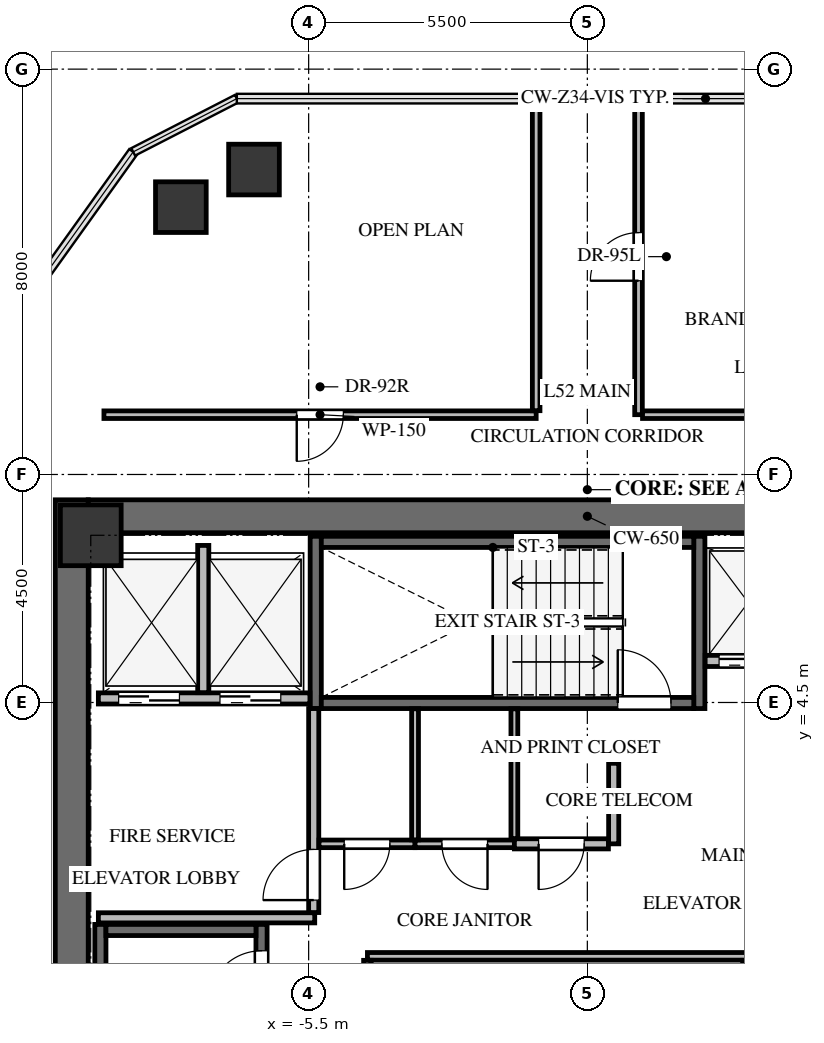
"""IFC4 building model, lengths in metres.
Left out: names, types, materials, properties, quantities, classifications, styles, units other than length and angle.
Written with IfcOpenShell. Run it as: python <this file> out.ifc"""

import sys

from ifc_helpers import new_model, si_unit, direction, frame, frame_2d, origin, origin_2d, place, context, subcontext, project, spatial, rectangle, extrude, source, transform, mapped, element, fill, save


model = new_model("IFC4")
c1 = context("Model", 3, precision=1e-05, world=origin(), true_north=direction((0.0, 1.0)))
c2 = subcontext(c1, "Body", "Model", "MODEL_VIEW")
j1 = project(units=[si_unit("LENGTHUNIT", "METRE"), si_unit("PLANEANGLEUNIT", "RADIAN")], contexts=[c1])
p1 = place(None, origin())
s1 = spatial("IfcSite", under=j1, at=p1, CompositionType="ELEMENT")
p2 = place(p1, origin())
s2 = spatial("IfcBuilding", under=s1, at=p2, CompositionType="ELEMENT")
p3 = place(p2, frame((0.0, 0.0, 190.3)))
s3 = spatial("IfcBuildingStorey", under=s2, at=p3, CompositionType="ELEMENT", Elevation=190.3)
p4 = place(p3, frame((-10.175, -8.5, 0.0), z_axis=(0.0, 0.0, 1.0), x_axis=(0.0, 1.0, 0.0)))
e1 = element("IfcWall", 1, at=p4, inside=s3, PredefinedType="SHEAR", context=c2, shape_type="SweptSolid", body=[
    extrude(rectangle(XDim=17.0, YDim=0.65, at=frame_2d((8.5, 0.0))), origin(), (0.0, 0.0, 1.0), 3.3),
])
p5 = place(p3, frame((-9.85, 8.175, 0.0), z_axis=(0.0, 0.0, 1.0), x_axis=(1.0, 0.0, 0.0)))
e2 = element("IfcWall", 2, at=p5, inside=s3, PredefinedType="SHEAR", context=c2, shape_type="SweptSolid", body=[
    extrude(rectangle(XDim=19.7, YDim=0.65, at=frame_2d((9.85, 0.0))), origin(), (0.0, 0.0, 1.0), 3.3),
])
p6 = place(p3, frame((-6.43, -7.77, -0.24), z_axis=(0.0, 0.0, 1.0), x_axis=(0.0, 1.0, 0.0)))
e3 = element("IfcWall", 3, at=p6, inside=s3, PredefinedType="SHEAR", context=c2, shape_type="SweptSolid", body=[
    extrude(rectangle(XDim=7.89, YDim=0.22, at=frame_2d((3.945, 0.0))), origin(), (0.0, 0.0, 1.0), 3.3),
])
p7 = place(p6, frame((6.32, 0.0, 0.0)))
e4 = element("IfcOpeningElement", 4, at=p7, cuts=e3, PredefinedType="OPENING", context=c2, shape_type="SweptSolid", body=[
    extrude(rectangle(XDim=1.05, YDim=2.15, at=frame_2d((0.525, 1.075))), frame((0.0, 0.12, 0.0), z_axis=(0.0, -1.0, 0.0), x_axis=(1.0, 0.0, 0.0)), (0.0, 0.0, 1.0), 0.24),
])
p8 = place(p3, frame((-9.61, 0.12, -0.24), z_axis=(0.0, 0.0, 1.0), x_axis=(0.0, -1.0, 0.0)))
e5 = element("IfcWall", 5, at=p8, inside=s3, PredefinedType="SHEAR", context=c2, shape_type="SweptSolid", body=[
    extrude(rectangle(XDim=7.89, YDim=0.22, at=frame_2d((3.945, 0.0))), origin(), (0.0, 0.0, 1.0), 3.3),
])
p9 = place(p3, frame((-6.54, 0.01, -0.24), z_axis=(0.0, 0.0, 1.0), x_axis=(-1.0, 0.0, 0.0)))
e6 = element("IfcWall", 6, at=p9, inside=s3, PredefinedType="SHEAR", context=c2, shape_type="SweptSolid", body=[
    extrude(rectangle(XDim=2.96, YDim=0.22, at=frame_2d((1.48, 0.0))), origin(), (0.0, 0.0, 1.0), 3.3),
])
for number, where, z_axis, x_axis in (
    (7, (2.21, 4.38, -0.24), (0.0, 0.0, 1.0), (0.0, 1.0, 0.0)),
    (8, (-5.36, 7.78, -0.24), (0.0, 0.0, 1.0), (0.0, -1.0, 0.0)),
):
    element("IfcWall", number, at=place(p3, frame(where, z_axis=z_axis, x_axis=x_axis)), inside=s3, PredefinedType="SHEAR", context=c2, shape_type="SweptSolid", body=[
        extrude(rectangle(XDim=3.4, YDim=0.22, at=frame_2d((1.7, 0.0))), origin(), (0.0, 0.0, 1.0), 3.3),
    ])
p10 = place(p3, frame((-5.25, 4.49, -0.24), z_axis=(0.0, 0.0, 1.0), x_axis=(1.0, 0.0, 0.0)))
e9 = element("IfcWall", 9, at=p10, inside=s3, PredefinedType="SHEAR", context=c2, shape_type="SweptSolid", body=[
    extrude(rectangle(XDim=7.35, YDim=0.22, at=frame_2d((3.675, 0.0))), origin(), (0.0, 0.0, 1.0), 3.3),
])
p11 = place(p10, frame((5.85, 0.0, 0.0)))
e10 = element("IfcOpeningElement", 10, at=p11, cuts=e9, PredefinedType="OPENING", context=c2, shape_type="SweptSolid", body=[
    extrude(rectangle(XDim=1.05, YDim=2.15, at=frame_2d((0.525, 1.075))), frame((0.0, 0.12, 0.0), z_axis=(0.0, -1.0, 0.0), x_axis=(1.0, 0.0, 0.0)), (0.0, 0.0, 1.0), 0.24),
])
p12 = place(p3, frame((2.1, 7.67, -0.24), z_axis=(0.0, 0.0, 1.0), x_axis=(-1.0, 0.0, 0.0)))
e11 = element("IfcWall", 11, at=p12, inside=s3, PredefinedType="SHEAR", context=c2, shape_type="SweptSolid", body=[
    extrude(rectangle(XDim=7.35, YDim=0.22, at=frame_2d((3.675, 0.0))), origin(), (0.0, 0.0, 1.0), 3.3),
])
m1 = source(origin(), c2, "Body", "SweptSolid", [
    extrude(rectangle(XDim=1.2, YDim=1.2, at=origin_2d()), origin(), (0.0, 0.0, 1.0), 3.3),
])
p13 = place(p3, frame((-9.8, 7.8, -0.24), z_axis=(0.0, 0.0, 1.0), x_axis=(1.0, 0.0, 0.0)))
e12 = element("IfcColumn", 12, at=p13, inside=s3, PredefinedType="COLUMN", context=c2, shape_type="MappedRepresentation", body=[
    mapped(m1, transform((0.0, 0.0, 0.0), x_axis=(1.0, 0.0, 0.0), y_axis=(0.0, 1.0, 0.0), z_axis=(0.0, 0.0, 1.0), scale=1.0)),
])
m2 = source(origin(), c2, "Body", "SweptSolid", [
    extrude(rectangle(XDim=1.0, YDim=1.0, at=origin_2d()), origin(), (0.0, 0.0, 1.0), 3.3),
])
for number, where, z_axis, x_axis in (
    (13, (-8.022, 14.276, -0.24), (0.0, 0.0, 1.0), (1.0, 0.0, 0.0)),
    (14, (-6.579, 15.018, -0.24), (0.0, 0.0, 1.0), (1.0, 0.0, 0.0)),
):
    element("IfcColumn", number, at=place(p3, frame(where, z_axis=z_axis, x_axis=x_axis)), inside=s3, PredefinedType="COLUMN", context=c2, shape_type="MappedRepresentation", body=[
        mapped(m2, transform((0.0, 0.0, 0.0), x_axis=(1.0, 0.0, 0.0), y_axis=(0.0, 1.0, 0.0), z_axis=(0.0, 0.0, 1.0), scale=1.0)),
    ])
p14 = place(p3, frame((-9.65, 4.58, 0.0), z_axis=(0.0, 0.0, 1.0), x_axis=(1.0, 0.0, 0.0)))
e15 = element("IfcWall", 15, at=p14, inside=s3, PredefinedType="SOLIDWALL", context=c2, shape_type="SweptSolid", body=[
    extrude(rectangle(XDim=4.175, YDim=0.22, at=frame_2d((2.087, 0.0))), origin(), (0.0, 0.0, 1.0), 3.045),
])
p15 = place(p14, frame((0.4, 0.0, 0.0)))
e16 = element("IfcOpeningElement", 16, at=p15, cuts=e15, PredefinedType="OPENING", context=c2, shape_type="SweptSolid", body=[
    extrude(rectangle(XDim=1.2, YDim=2.15, at=frame_2d((0.6, 1.075))), frame((0.0, 0.12, 0.0), z_axis=(0.0, -1.0, 0.0), x_axis=(1.0, 0.0, 0.0)), (0.0, 0.0, 1.0), 0.24),
])
p16 = place(p14, frame((2.4, 0.0, 0.0)))
e17 = element("IfcOpeningElement", 17, at=p16, cuts=e15, PredefinedType="OPENING", context=c2, shape_type="SweptSolid", body=[
    extrude(rectangle(XDim=1.2, YDim=2.15, at=frame_2d((0.6, 1.075))), frame((0.0, 0.12, 0.0), z_axis=(0.0, -1.0, 0.0), x_axis=(1.0, 0.0, 0.0)), (0.0, 0.0, 1.0), 0.24),
])
p17 = place(p3, frame((-7.58, 4.694, 0.0), z_axis=(0.0, 0.0, 1.0), x_axis=(0.0, 1.0, 0.0)))
e18 = element("IfcWall", 18, at=p17, inside=s3, PredefinedType="SOLIDWALL", context=c2, shape_type="SweptSolid", body=[
    extrude(rectangle(XDim=2.906, YDim=0.22, at=frame_2d((1.453, 0.0))), origin(), (0.0, 0.0, 1.0), 3.045),
])
p18 = place(p3, frame((-9.65, 0.25, 0.0), z_axis=(0.0, 0.0, 1.0), x_axis=(1.0, 0.0, 0.0)))
e19 = element("IfcWall", 19, at=p18, inside=s3, PredefinedType="SOLIDWALL", context=c2, shape_type="SweptSolid", body=[
    extrude(rectangle(XDim=4.27, YDim=0.2, at=frame_2d((2.135, 0.0))), origin(), (0.0, 0.0, 1.0), 3.045),
])
p19 = place(p3, frame((-5.4, 0.354, 0.0), z_axis=(0.0, 0.0, 1.0), x_axis=(0.0, 1.0, 0.0)))
e20 = element("IfcWall", 20, at=p19, inside=s3, PredefinedType="SOLIDWALL", context=c2, shape_type="SweptSolid", body=[
    extrude(rectangle(XDim=4.026, YDim=0.2, at=frame_2d((2.013, 0.0))), origin(), (0.0, 0.0, 1.0), 3.045),
])
p20 = place(p19, frame((0.246, 0.0, 0.0)))
e21 = element("IfcOpeningElement", 21, at=p20, cuts=e20, PredefinedType="OPENING", context=c2, shape_type="SweptSolid", body=[
    extrude(rectangle(XDim=1.0, YDim=2.15, at=frame_2d((0.5, 1.075))), frame((0.0, 0.11, 0.0), z_axis=(0.0, -1.0, 0.0), x_axis=(1.0, 0.0, 0.0)), (0.0, 0.0, 1.0), 0.22),
])
p21 = place(p3, frame((2.325, 5.32, 0.0), z_axis=(0.0, 0.0, 1.0), x_axis=(1.0, 0.0, 0.0)))
e22 = element("IfcWall", 22, at=p21, inside=s3, PredefinedType="SOLIDWALL", context=c2, shape_type="SweptSolid", body=[
    extrude(rectangle(XDim=7.325, YDim=0.22, at=frame_2d((3.663, 0.0))), origin(), (0.0, 0.0, 1.0), 3.045),
])
p22 = place(p21, frame((0.275, 0.0, 0.0)))
e23 = element("IfcOpeningElement", 23, at=p22, cuts=e22, PredefinedType="OPENING", context=c2, shape_type="SweptSolid", body=[
    extrude(rectangle(XDim=1.1, YDim=2.15, at=frame_2d((0.55, 1.075))), frame((0.0, 0.12, 0.0), z_axis=(0.0, -1.0, 0.0), x_axis=(1.0, 0.0, 0.0)), (0.0, 0.0, 1.0), 0.24),
])
p23 = place(p21, frame((2.045, 0.0, 0.0)))
e24 = element("IfcOpeningElement", 24, at=p23, cuts=e22, PredefinedType="OPENING", context=c2, shape_type="SweptSolid", body=[
    extrude(rectangle(XDim=1.1, YDim=2.15, at=frame_2d((0.55, 1.075))), frame((0.0, 0.12, 0.0), z_axis=(0.0, -1.0, 0.0), x_axis=(1.0, 0.0, 0.0)), (0.0, 0.0, 1.0), 0.24),
])
p24 = place(p21, frame((3.815, 0.0, 0.0)))
e25 = element("IfcOpeningElement", 25, at=p24, cuts=e22, PredefinedType="OPENING", context=c2, shape_type="SweptSolid", body=[
    extrude(rectangle(XDim=1.1, YDim=2.15, at=frame_2d((0.55, 1.075))), frame((0.0, 0.12, 0.0), z_axis=(0.0, -1.0, 0.0), x_axis=(1.0, 0.0, 0.0)), (0.0, 0.0, 1.0), 0.24),
])
p25 = place(p21, frame((5.585, 0.0, 0.0)))
e26 = element("IfcOpeningElement", 26, at=p25, cuts=e22, PredefinedType="OPENING", context=c2, shape_type="SweptSolid", body=[
    extrude(rectangle(XDim=1.1, YDim=2.15, at=frame_2d((0.55, 1.075))), frame((0.0, 0.12, 0.0), z_axis=(0.0, -1.0, 0.0), x_axis=(1.0, 0.0, 0.0)), (0.0, 0.0, 1.0), 0.24),
])
p26 = place(p3, frame((-4.34, -0.51, 0.0), z_axis=(0.0, 0.0, 1.0), x_axis=(1.0, 0.0, 0.0)))
e27 = element("IfcWall", 27, at=p26, inside=s3, PredefinedType="PARTITIONING", context=c2, shape_type="SweptSolid", body=[
    extrude(rectangle(XDim=7.48, YDim=0.15, at=frame_2d((3.74, 0.0))), origin(), (0.0, 0.0, 1.0), 3.045),
])
for number, where, z_axis, x_axis in (
    (28, (-4.34, -2.961, 0.0), (0.0, 0.0, 1.0), (0.0, 1.0, 0.0)),
    (29, (3.14, -0.589, 0.0), (0.0, 0.0, 1.0), (0.0, -1.0, 0.0)),
):
    element("IfcWall", number, at=place(p3, frame(where, z_axis=z_axis, x_axis=x_axis)), inside=s3, PredefinedType="PARTITIONING", context=c2, shape_type="SweptSolid", body=[
        extrude(rectangle(XDim=2.372, YDim=0.15, at=frame_2d((1.186, 0.0))), origin(), (0.0, 0.0, 1.0), 3.045),
    ])
p27 = place(p3, frame((-3.4, 1.71, 0.0), z_axis=(0.0, 0.0, 1.0), x_axis=(-1.0, 0.0, 0.0)))
e30 = element("IfcWall", 30, at=p27, inside=s3, PredefinedType="PARTITIONING", context=c2, shape_type="SweptSolid", body=[
    extrude(rectangle(XDim=1.896, YDim=0.15, at=frame_2d((0.948, 0.0))), origin(), (0.0, 0.0, 1.0), 3.045),
])
p28 = place(p27, frame((0.498, 0.0, 0.0)))
e31 = element("IfcOpeningElement", 31, at=p28, cuts=e30, PredefinedType="OPENING", context=c2, shape_type="SweptSolid", body=[
    extrude(rectangle(XDim=0.9, YDim=2.05, at=frame_2d((0.45, 1.025))), frame((0.0, 0.085, 0.0), z_axis=(0.0, -1.0, 0.0), x_axis=(1.0, 0.0, 0.0)), (0.0, 0.0, 1.0), 0.17),
])
p29 = place(p3, frame((-1.44, 1.71, 0.0), z_axis=(0.0, 0.0, 1.0), x_axis=(-1.0, 0.0, 0.0)))
e32 = element("IfcWall", 32, at=p29, inside=s3, PredefinedType="PARTITIONING", context=c2, shape_type="SweptSolid", body=[
    extrude(rectangle(XDim=1.96, YDim=0.15, at=frame_2d((0.98, 0.0))), origin(), (0.0, 0.0, 1.0), 3.045),
])
p30 = place(p29, frame((0.53, 0.0, 0.0)))
e33 = element("IfcOpeningElement", 33, at=p30, cuts=e32, PredefinedType="OPENING", context=c2, shape_type="SweptSolid", body=[
    extrude(rectangle(XDim=0.9, YDim=2.05, at=frame_2d((0.45, 1.025))), frame((0.0, 0.085, 0.0), z_axis=(0.0, -1.0, 0.0), x_axis=(1.0, 0.0, 0.0)), (0.0, 0.0, 1.0), 0.17),
])
p31 = place(p3, frame((0.52, 3.3, 0.0), z_axis=(0.0, 0.0, 1.0), x_axis=(0.0, -1.0, 0.0)))
e34 = element("IfcWall", 34, at=p31, inside=s3, PredefinedType="SOLIDWALL", context=c2, shape_type="SweptSolid", body=[
    extrude(rectangle(XDim=1.59, YDim=0.2, at=frame_2d((0.795, 0.0))), origin(), (0.0, 0.0, 1.0), 3.045),
])
p32 = place(p3, frame((0.416, 1.71, 0.0), z_axis=(0.0, 0.0, 1.0), x_axis=(-1.0, 0.0, 0.0)))
e35 = element("IfcWall", 35, at=p32, inside=s3, PredefinedType="SOLIDWALL", context=c2, shape_type="SweptSolid", body=[
    extrude(rectangle(XDim=1.856, YDim=0.2, at=frame_2d((0.928, 0.0))), origin(), (0.0, 0.0, 1.0), 3.045),
])
p33 = place(p32, frame((0.478, 0.0, 0.0)))
e36 = element("IfcOpeningElement", 36, at=p33, cuts=e35, PredefinedType="OPENING", context=c2, shape_type="SweptSolid", body=[
    extrude(rectangle(XDim=0.9, YDim=2.05, at=frame_2d((0.45, 1.025))), frame((0.0, 0.11, 0.0), z_axis=(0.0, -1.0, 0.0), x_axis=(1.0, 0.0, 0.0)), (0.0, 0.0, 1.0), 0.22),
])
p34 = place(p3, frame((-1.01, 10.18, 0.0), z_axis=(0.0, 0.0, 1.0), x_axis=(-1.0, 0.0, 0.0)))
e37 = element("IfcWall", 37, at=p34, inside=s3, PredefinedType="PARTITIONING", context=c2, shape_type="SweptSolid", body=[
    extrude(rectangle(XDim=8.53, YDim=0.15, at=frame_2d((4.265, 0.0))), origin(), (0.0, 0.0, 1.0), 2.242),
])
p35 = place(p34, frame((3.805, 0.0, 0.0)))
e38 = element("IfcOpeningElement", 38, at=p35, cuts=e37, PredefinedType="OPENING", context=c2, shape_type="SweptSolid", body=[
    extrude(rectangle(XDim=0.92, YDim=2.1, at=frame_2d((0.46, 1.05))), frame((0.0, 0.085, 0.0), z_axis=(0.0, -1.0, 0.0), x_axis=(1.0, 0.0, 0.0)), (0.0, 0.0, 1.0), 0.17),
])
p36 = place(p3, frame((-1.01, 16.418, 0.0), z_axis=(0.0, 0.0, 1.0), x_axis=(0.0, -1.0, 0.0)))
e39 = element("IfcWall", 39, at=p36, inside=s3, PredefinedType="PARTITIONING", context=c2, shape_type="SweptSolid", body=[
    extrude(rectangle(XDim=6.159, YDim=0.15, at=frame_2d((3.08, 0.0))), origin(), (0.0, 0.0, 1.0), 2.399),
])
p37 = place(p3, frame((1.01, 10.18, 0.0), z_axis=(0.0, 0.0, 1.0), x_axis=(0.0, 1.0, 0.0)))
e40 = element("IfcWall", 40, at=p37, inside=s3, PredefinedType="PARTITIONING", context=c2, shape_type="SweptSolid", body=[
    extrude(rectangle(XDim=6.238, YDim=0.15, at=frame_2d((3.119, 0.0))), origin(), (0.0, 0.0, 1.0), 2.399),
])
p38 = place(p37, frame((2.644, 0.0, 0.0)))
e41 = element("IfcOpeningElement", 41, at=p38, cuts=e40, PredefinedType="OPENING", context=c2, shape_type="SweptSolid", body=[
    extrude(rectangle(XDim=0.95, YDim=2.1, at=frame_2d((0.475, 1.05))), frame((0.0, 0.085, 0.0), z_axis=(0.0, -1.0, 0.0), x_axis=(1.0, 0.0, 0.0)), (0.0, 0.0, 1.0), 0.17),
])
p39 = place(p3, frame((5.54, 10.18, 0.0), z_axis=(0.0, 0.0, 1.0), x_axis=(-1.0, 0.0, 0.0)))
e42 = element("IfcWall", 42, at=p39, inside=s3, PredefinedType="PARTITIONING", context=c2, shape_type="SweptSolid", body=[
    extrude(rectangle(XDim=4.451, YDim=0.15, at=frame_2d((2.226, 0.0))), origin(), (0.0, 0.0, 1.0), 2.608),
])
p40 = place(p3, frame((-3.4, 4.375, 0.0), z_axis=(0.0, 0.0, 1.0), x_axis=(0.0, -1.0, 0.0)))
e43 = element("IfcWall", 43, at=p40, inside=s3, PredefinedType="PARTITIONING", context=c2, shape_type="SweptSolid", body=[
    extrude(rectangle(XDim=2.586, YDim=0.135, at=frame_2d((1.293, 0.0))), origin(), (0.0, 0.0, 1.0), 3.045),
])
p41 = place(p3, frame((-1.44, 4.375, 0.0), z_axis=(0.0, 0.0, 1.0), x_axis=(0.0, -1.0, 0.0)))
e44 = element("IfcWall", 44, at=p41, inside=s3, PredefinedType="PARTITIONING", context=c2, shape_type="SweptSolid", body=[
    extrude(rectangle(XDim=2.561, YDim=0.135, at=frame_2d((1.281, 0.0))), origin(), (0.0, 0.0, 1.0), 3.045),
])
m3 = source(origin(), c2, "Body", "SweptSolid", [
    extrude(rectangle(XDim=1.05, YDim=2.15, at=frame_2d((0.525, 1.075))), frame((0.0, 0.025, 0.0), z_axis=(0.0, -1.0, 0.0), x_axis=(1.0, 0.0, 0.0)), (0.0, 0.0, 1.0), 0.05),
])
p42 = place(p7, origin())
e45 = element("IfcDoor", 45, at=p42, inside=s3, OperationType="SINGLE_SWING_LEFT", PredefinedType="DOOR", context=c2, shape_type="MappedRepresentation", body=[
    mapped(m3, transform((0.0, 0.0, 0.0), x_axis=(1.0, 0.0, 0.0), y_axis=(0.0, 1.0, 0.0), z_axis=(0.0, 0.0, 1.0), scale=1.0)),
])
fill(e4, e45)
p43 = place(p11, origin())
e46 = element("IfcDoor", 46, at=p43, inside=s3, OperationType="SINGLE_SWING_LEFT", PredefinedType="DOOR", context=c2, shape_type="MappedRepresentation", body=[
    mapped(m3, transform((0.0, 0.0, 0.0), x_axis=(1.0, 0.0, 0.0), y_axis=(0.0, 1.0, 0.0), z_axis=(0.0, 0.0, 1.0), scale=1.0)),
])
fill(e10, e46)
m4 = source(origin(), c2, "Body", "SweptSolid", [
    extrude(rectangle(XDim=1.2, YDim=2.15, at=frame_2d((0.6, 1.075))), frame((0.0, 0.025, 0.0), z_axis=(0.0, -1.0, 0.0), x_axis=(1.0, 0.0, 0.0)), (0.0, 0.0, 1.0), 0.05),
])
p44 = place(p15, origin())
e47 = element("IfcDoor", 47, at=p44, inside=s3, OperationType="DOUBLE_DOOR_SLIDING", PredefinedType="DOOR", context=c2, shape_type="MappedRepresentation", body=[
    mapped(m4, transform((0.0, 0.0, 0.0), x_axis=(1.0, 0.0, 0.0), y_axis=(0.0, 1.0, 0.0), z_axis=(0.0, 0.0, 1.0), scale=1.0)),
])
fill(e16, e47)
p45 = place(p16, origin())
e48 = element("IfcDoor", 48, at=p45, inside=s3, OperationType="DOUBLE_DOOR_SLIDING", PredefinedType="DOOR", context=c2, shape_type="MappedRepresentation", body=[
    mapped(m4, transform((0.0, 0.0, 0.0), x_axis=(1.0, 0.0, 0.0), y_axis=(0.0, 1.0, 0.0), z_axis=(0.0, 0.0, 1.0), scale=1.0)),
])
fill(e17, e48)
m5 = source(origin(), c2, "Body", "SweptSolid", [
    extrude(rectangle(XDim=1.0, YDim=2.15, at=frame_2d((0.5, 1.075))), frame((0.0, 0.025, 0.0), z_axis=(0.0, -1.0, 0.0), x_axis=(1.0, 0.0, 0.0)), (0.0, 0.0, 1.0), 0.05),
])
p46 = place(p20, origin())
e49 = element("IfcDoor", 49, at=p46, inside=s3, OperationType="SINGLE_SWING_LEFT", PredefinedType="DOOR", context=c2, shape_type="MappedRepresentation", body=[
    mapped(m5, transform((0.0, 0.0, 0.0), x_axis=(1.0, 0.0, 0.0), y_axis=(0.0, 1.0, 0.0), z_axis=(0.0, 0.0, 1.0), scale=1.0)),
])
fill(e21, e49)
m6 = source(origin(), c2, "Body", "SweptSolid", [
    extrude(rectangle(XDim=1.1, YDim=2.15, at=frame_2d((0.55, 1.075))), frame((0.0, 0.025, 0.0), z_axis=(0.0, -1.0, 0.0), x_axis=(1.0, 0.0, 0.0)), (0.0, 0.0, 1.0), 0.05),
])
p47 = place(p22, origin())
e50 = element("IfcDoor", 50, at=p47, inside=s3, OperationType="DOUBLE_DOOR_SLIDING", PredefinedType="DOOR", context=c2, shape_type="MappedRepresentation", body=[
    mapped(m6, transform((0.0, 0.0, 0.0), x_axis=(1.0, 0.0, 0.0), y_axis=(0.0, 1.0, 0.0), z_axis=(0.0, 0.0, 1.0), scale=1.0)),
])
fill(e23, e50)
m7 = source(origin(), c2, "Body", "SweptSolid", [
    extrude(rectangle(XDim=0.9, YDim=2.05, at=frame_2d((0.45, 1.025))), frame((0.0, 0.025, 0.0), z_axis=(0.0, -1.0, 0.0), x_axis=(1.0, 0.0, 0.0)), (0.0, 0.0, 1.0), 0.05),
])
p48 = place(p28, origin())
e51 = element("IfcDoor", 51, at=p48, inside=s3, OperationType="SINGLE_SWING_RIGHT", PredefinedType="DOOR", context=c2, shape_type="MappedRepresentation", body=[
    mapped(m7, transform((0.0, 0.0, 0.0), x_axis=(1.0, 0.0, 0.0), y_axis=(0.0, 1.0, 0.0), z_axis=(0.0, 0.0, 1.0), scale=1.0)),
])
fill(e31, e51)
m8 = source(origin(), c2, "Body", "SweptSolid", [
    extrude(rectangle(XDim=0.9, YDim=2.05, at=frame_2d((0.45, 1.025))), frame((0.0, 0.025, 0.0), z_axis=(0.0, -1.0, 0.0), x_axis=(1.0, 0.0, 0.0)), (0.0, 0.0, 1.0), 0.05),
])
p49 = place(p30, origin())
e52 = element("IfcDoor", 52, at=p49, inside=s3, OperationType="SINGLE_SWING_LEFT", PredefinedType="DOOR", context=c2, shape_type="MappedRepresentation", body=[
    mapped(m8, transform((0.0, 0.0, 0.0), x_axis=(1.0, 0.0, 0.0), y_axis=(0.0, 1.0, 0.0), z_axis=(0.0, 0.0, 1.0), scale=1.0)),
])
fill(e33, e52)
p50 = place(p33, origin())
e53 = element("IfcDoor", 53, at=p50, inside=s3, OperationType="SINGLE_SWING_RIGHT", PredefinedType="DOOR", context=c2, shape_type="MappedRepresentation", body=[
    mapped(m7, transform((0.0, 0.0, 0.0), x_axis=(1.0, 0.0, 0.0), y_axis=(0.0, 1.0, 0.0), z_axis=(0.0, 0.0, 1.0), scale=1.0)),
])
fill(e36, e53)
m9 = source(origin(), c2, "Body", "SweptSolid", [
    extrude(rectangle(XDim=0.92, YDim=2.1, at=frame_2d((0.46, 1.05))), frame((0.0, 0.025, 0.0), z_axis=(0.0, -1.0, 0.0), x_axis=(1.0, 0.0, 0.0)), (0.0, 0.0, 1.0), 0.05),
])
p51 = place(p35, origin())
e54 = element("IfcDoor", 54, at=p51, inside=s3, OperationType="SINGLE_SWING_RIGHT", PredefinedType="DOOR", context=c2, shape_type="MappedRepresentation", body=[
    mapped(m9, transform((0.0, 0.0, 0.0), x_axis=(1.0, 0.0, 0.0), y_axis=(0.0, 1.0, 0.0), z_axis=(0.0, 0.0, 1.0), scale=1.0)),
])
fill(e38, e54)
m10 = source(origin(), c2, "Body", "SweptSolid", [
    extrude(rectangle(XDim=0.95, YDim=2.1, at=frame_2d((0.475, 1.05))), frame((0.0, 0.025, 0.0), z_axis=(0.0, -1.0, 0.0), x_axis=(1.0, 0.0, 0.0)), (0.0, 0.0, 1.0), 0.05),
])
p52 = place(p38, origin())
e55 = element("IfcDoor", 55, at=p52, inside=s3, OperationType="SINGLE_SWING_LEFT", PredefinedType="DOOR", context=c2, shape_type="MappedRepresentation", body=[
    mapped(m10, transform((0.0, 0.0, 0.0), x_axis=(1.0, 0.0, 0.0), y_axis=(0.0, 1.0, 0.0), z_axis=(0.0, 0.0, 1.0), scale=1.0)),
])
fill(e41, e55)
save(model, sys.argv[1])
